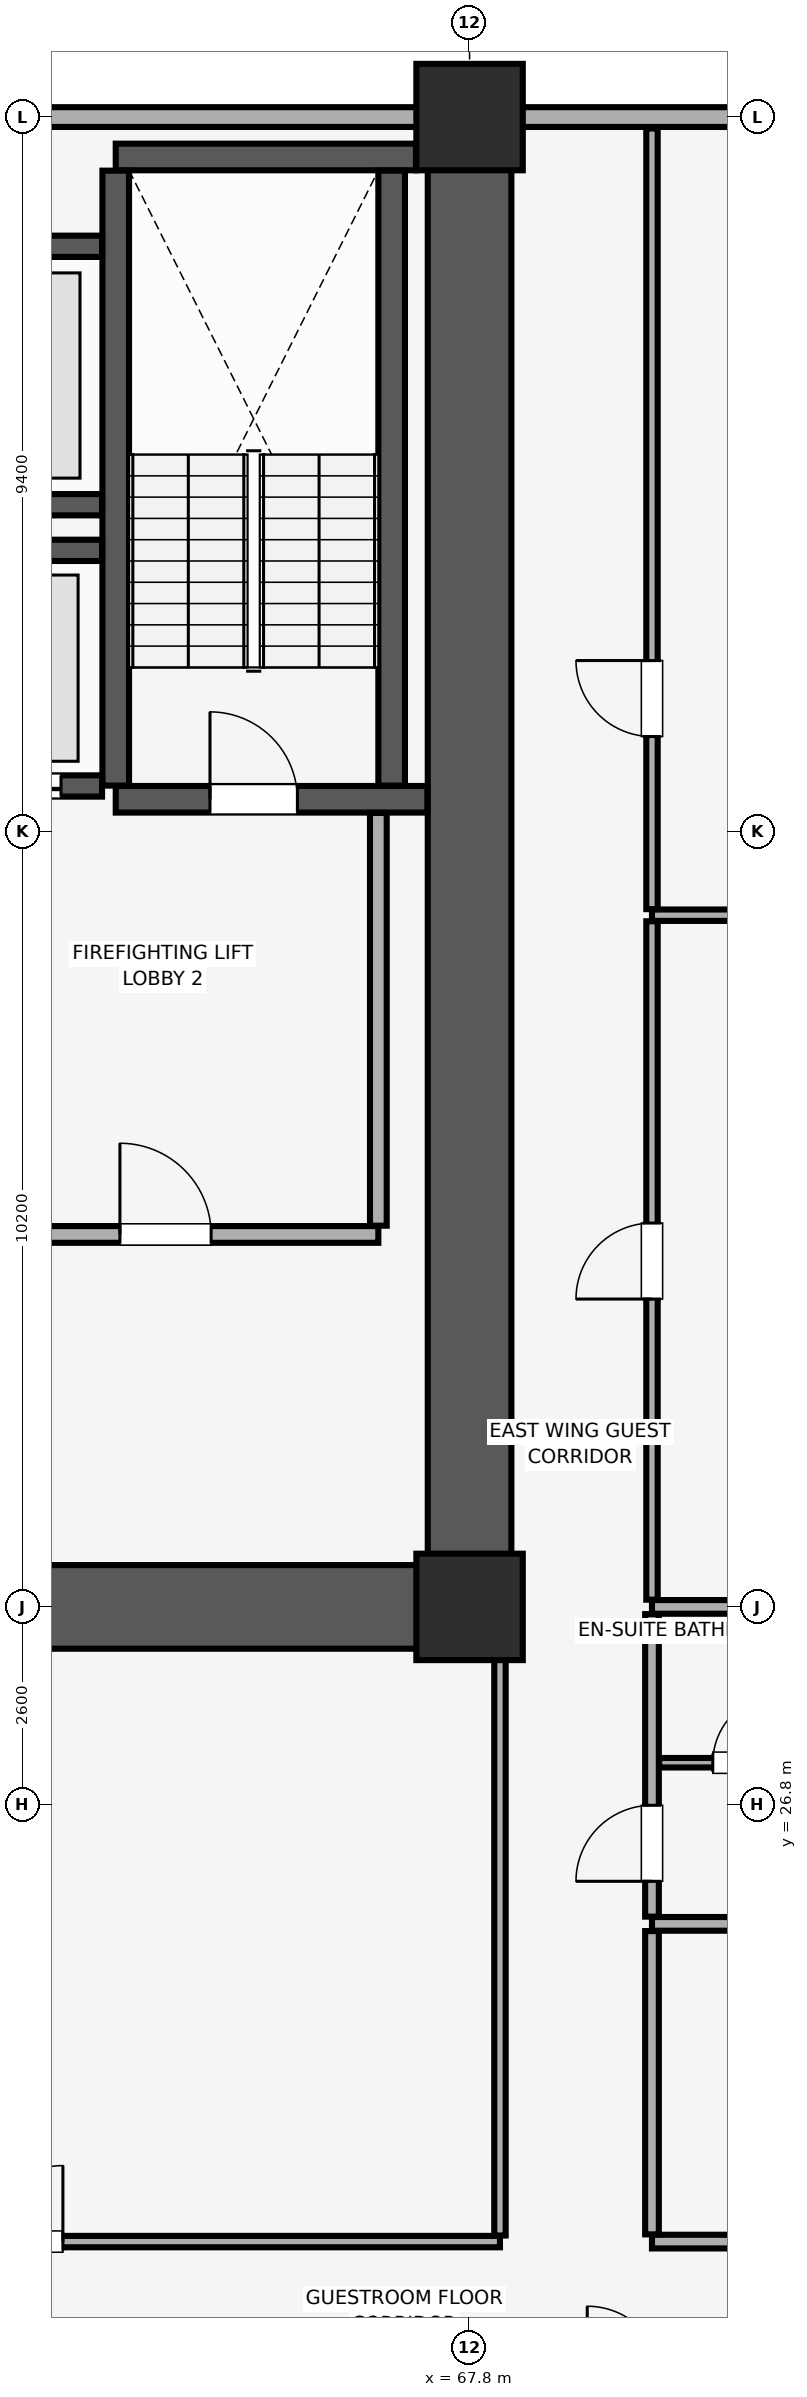
"""IFC4 building model, lengths in metres.
Left out: names, types, materials, properties, quantities, classifications, styles, units other than length and angle.
Written with IfcOpenShell. Run it as: python <this file> out.ifc"""

import sys

from ifc_helpers import new_model, si_unit, direction, frame, frame_2d, origin, origin_2d, place, context, subcontext, project, spatial, rectangle, extrude, element, fill, save


model = new_model("IFC4")
c1 = context("Model", 3, precision=1e-05, world=origin(), true_north=direction((0.0, 1.0)))
c2 = subcontext(c1, "Body", "Model", "MODEL_VIEW")
j1 = project(units=[si_unit("LENGTHUNIT", "METRE"), si_unit("PLANEANGLEUNIT", "RADIAN")], contexts=[c1])
p1 = place(None, origin())
s1 = spatial("IfcSite", under=j1, at=p1, CompositionType="ELEMENT")
p2 = place(p1, origin())
s2 = spatial("IfcBuilding", under=s1, at=p2, CompositionType="ELEMENT")
p3 = place(p2, frame((0.0, 0.0, 72.65)))
s3 = spatial("IfcBuildingStorey", under=s2, at=p3, CompositionType="ELEMENT", Elevation=72.65)
for number, where, z_axis, x_axis in (
    (1, (67.8, 29.4, 0.0), (0.0, 0.0, 1.0), (1.0, 0.0, 0.0)),
    (2, (67.8, 49.0, 0.0), (0.0, 0.0, 1.0), (1.0, 0.0, 0.0)),
):
    element("IfcColumn", number, at=place(p3, frame(where, z_axis=z_axis, x_axis=x_axis)), inside=s3, PredefinedType="COLUMN", context=c2, shape_type="SweptSolid", body=[
        extrude(rectangle(XDim=1.4, YDim=1.4, at=origin_2d()), origin(), (0.0, 0.0, 1.0), 3.51),
    ])
p4 = place(p3, frame((79.8, 49.0, 0.0), z_axis=(0.0, 0.0, 1.0), x_axis=(-1.0, 0.0, 0.0)))
e3 = element("IfcWall", 3, at=p4, inside=s3, PredefinedType="SOLIDWALL", context=c2, shape_type="SweptSolid", body=[
    extrude(rectangle(XDim=75.6, YDim=0.26, at=frame_2d((37.8, 0.0))), origin(), (0.0, 0.0, 1.0), 2.56),
])
p5 = place(p4, frame((72.565, 0.0, 0.85)))
e4 = element("IfcOpeningElement", 4, at=p5, cuts=e3, PredefinedType="OPENING", context=c2, shape_type="SweptSolid", body=[
    extrude(rectangle(XDim=1.5, YDim=1.4, at=frame_2d((0.75, 0.7))), frame((0.0, 0.14, 0.0), z_axis=(0.0, -1.0, 0.0), x_axis=(1.0, 0.0, 0.0)), (0.0, 0.0, 1.0), 0.28),
])
p6 = place(p4, frame((67.45, 0.0, 0.85)))
e5 = element("IfcOpeningElement", 5, at=p6, cuts=e3, PredefinedType="OPENING", context=c2, shape_type="SweptSolid", body=[
    extrude(rectangle(XDim=1.5, YDim=1.4, at=frame_2d((0.75, 0.7))), frame((0.0, 0.14, 0.0), z_axis=(0.0, -1.0, 0.0), x_axis=(1.0, 0.0, 0.0)), (0.0, 0.0, 1.0), 0.28),
])
p7 = place(p4, frame((6.65, 0.0, 0.85)))
e6 = element("IfcOpeningElement", 6, at=p7, cuts=e3, PredefinedType="OPENING", context=c2, shape_type="SweptSolid", body=[
    extrude(rectangle(XDim=1.5, YDim=1.4, at=frame_2d((0.75, 0.7))), frame((0.0, 0.14, 0.0), z_axis=(0.0, -1.0, 0.0), x_axis=(1.0, 0.0, 0.0)), (0.0, 0.0, 1.0), 0.28),
])
p8 = place(p4, frame((1.535, 0.0, 0.85)))
e7 = element("IfcOpeningElement", 7, at=p8, cuts=e3, PredefinedType="OPENING", context=c2, shape_type="SweptSolid", body=[
    extrude(rectangle(XDim=1.5, YDim=1.4, at=frame_2d((0.75, 0.7))), frame((0.0, 0.14, 0.0), z_axis=(0.0, -1.0, 0.0), x_axis=(1.0, 0.0, 0.0)), (0.0, 0.0, 1.0), 0.28),
])
p9 = place(p4, frame((51.365, 0.0, 0.9)))
e8 = element("IfcOpeningElement", 8, at=p9, cuts=e3, PredefinedType="OPENING", context=c2, shape_type="SweptSolid", body=[
    extrude(rectangle(XDim=1.5, YDim=1.4, at=frame_2d((0.75, 0.7))), frame((0.0, 0.14, 0.0), z_axis=(0.0, -1.0, 0.0), x_axis=(1.0, 0.0, 0.0)), (0.0, 0.0, 1.0), 0.28),
])
p10 = place(p4, frame((44.55, 0.0, 0.9)))
e9 = element("IfcOpeningElement", 9, at=p10, cuts=e3, PredefinedType="OPENING", context=c2, shape_type="SweptSolid", body=[
    extrude(rectangle(XDim=1.5, YDim=1.4, at=frame_2d((0.75, 0.7))), frame((0.0, 0.14, 0.0), z_axis=(0.0, -1.0, 0.0), x_axis=(1.0, 0.0, 0.0)), (0.0, 0.0, 1.0), 0.28),
])
p11 = place(p4, frame((28.1, 0.0, 0.9)))
e10 = element("IfcOpeningElement", 10, at=p11, cuts=e3, PredefinedType="OPENING", context=c2, shape_type="SweptSolid", body=[
    extrude(rectangle(XDim=1.5, YDim=1.4, at=frame_2d((0.75, 0.7))), frame((0.0, 0.14, 0.0), z_axis=(0.0, -1.0, 0.0), x_axis=(1.0, 0.0, 0.0)), (0.0, 0.0, 1.0), 0.28),
])
p12 = place(p4, frame((23.485, 0.0, 0.9)))
e11 = element("IfcOpeningElement", 11, at=p12, cuts=e3, PredefinedType="OPENING", context=c2, shape_type="SweptSolid", body=[
    extrude(rectangle(XDim=1.5, YDim=1.4, at=frame_2d((0.75, 0.7))), frame((0.0, 0.14, 0.0), z_axis=(0.0, -1.0, 0.0), x_axis=(1.0, 0.0, 0.0)), (0.0, 0.0, 1.0), 0.28),
])
p13 = place(p3, frame((67.8, 29.4, 0.0), z_axis=(0.0, 0.0, 1.0), x_axis=(0.0, 1.0, 0.0)))
e12 = element("IfcWall", 12, at=p13, inside=s3, PredefinedType="SHEAR", context=c2, shape_type="SweptSolid", body=[
    extrude(rectangle(XDim=19.2, YDim=1.1, at=frame_2d((9.6, 0.0))), origin(), (0.0, 0.0, 1.0), 3.51),
])
p14 = place(p3, frame((60.4, 29.4, 0.0), z_axis=(0.0, 0.0, 1.0), x_axis=(1.0, 0.0, 0.0)))
e13 = element("IfcWall", 13, at=p14, inside=s3, PredefinedType="SHEAR", context=c2, shape_type="SweptSolid", body=[
    extrude(rectangle(XDim=6.845, YDim=1.1, at=frame_2d((3.423, 0.0))), origin(), (0.0, 0.0, 1.0), 3.51),
])
p15 = place(p3, frame((63.145, 40.025, 0.0), z_axis=(0.0, 0.0, 1.0), x_axis=(1.0, 0.0, 0.0)))
e14 = element("IfcWall", 14, at=p15, inside=s3, PredefinedType="SHEAR", context=c2, shape_type="SweptSolid", body=[
    extrude(rectangle(XDim=4.1, YDim=0.35, at=frame_2d((2.05, 0.0))), origin(), (0.0, 0.0, 1.0), 3.51),
])
p16 = place(p15, frame((1.24, 0.0, 0.0)))
e15 = element("IfcOpeningElement", 15, at=p16, cuts=e14, PredefinedType="OPENING", context=c2, shape_type="SweptSolid", body=[
    extrude(rectangle(XDim=1.15, YDim=2.15, at=frame_2d((0.575, 1.075))), frame((0.0, 0.185, 0.0), z_axis=(0.0, -1.0, 0.0), x_axis=(1.0, 0.0, 0.0)), (0.0, 0.0, 1.0), 0.37),
])
p17 = place(p3, frame((63.145, 48.475, 0.0), z_axis=(0.0, 0.0, 1.0), x_axis=(1.0, 0.0, 0.0)))
e16 = element("IfcWall", 16, at=p17, inside=s3, PredefinedType="SHEAR", context=c2, shape_type="SweptSolid", body=[
    extrude(rectangle(XDim=3.95, YDim=0.35, at=frame_2d((1.975, 0.0))), origin(), (0.0, 0.0, 1.0), 3.51),
])
for number, where, z_axis, x_axis in (
    (17, (63.145, 40.205, 0.0), (0.0, 0.0, 1.0), (0.0, 1.0, 0.0)),
    (18, (66.775, 40.205, 0.0), (0.0, 0.0, 1.0), (0.0, 1.0, 0.0)),
):
    element("IfcWall", number, at=place(p3, frame(where, z_axis=z_axis, x_axis=x_axis)), inside=s3, PredefinedType="SHEAR", context=c2, shape_type="SweptSolid", body=[
        extrude(rectangle(XDim=8.09, YDim=0.35, at=frame_2d((4.045, 0.0))), origin(), (0.0, 0.0, 1.0), 3.51),
    ])
p18 = place(p3, frame((60.55, 40.2, 0.0), z_axis=(0.0, 0.0, 1.0), x_axis=(1.0, 0.0, 0.0)))
e19 = element("IfcWall", 19, at=p18, inside=s3, PredefinedType="SHEAR", context=c2, shape_type="SweptSolid", body=[
    extrude(rectangle(XDim=2.415, YDim=0.28, at=frame_2d((1.208, 0.0))), origin(), (0.0, 0.0, 1.0), 3.51),
])
p19 = place(p18, frame((0.575, 0.0, 0.0)))
e20 = element("IfcOpeningElement", 20, at=p19, cuts=e19, PredefinedType="OPENING", context=c2, shape_type="SweptSolid", body=[
    extrude(rectangle(XDim=1.3, YDim=2.3, at=frame_2d((0.65, 1.15))), frame((0.0, 0.15, 0.0), z_axis=(0.0, -1.0, 0.0), x_axis=(1.0, 0.0, 0.0)), (0.0, 0.0, 1.0), 0.3),
])
for number, where, z_axis, x_axis in (
    (21, (60.55, 43.3, 0.0), (0.0, 0.0, 1.0), (1.0, 0.0, 0.0)),
    (22, (60.55, 43.9, 0.0), (0.0, 0.0, 1.0), (1.0, 0.0, 0.0)),
    (23, (60.55, 47.3, 0.0), (0.0, 0.0, 1.0), (1.0, 0.0, 0.0)),
):
    element("IfcWall", number, at=place(p3, frame(where, z_axis=z_axis, x_axis=x_axis)), inside=s3, PredefinedType="SHEAR", context=c2, shape_type="SweptSolid", body=[
        extrude(rectangle(XDim=2.415, YDim=0.28, at=frame_2d((1.208, 0.0))), origin(), (0.0, 0.0, 1.0), 3.51),
    ])
p20 = place(p3, frame((60.55, 34.3, 0.0), z_axis=(0.0, 0.0, 1.0), x_axis=(1.0, 0.0, 0.0)))
e24 = element("IfcWall", 24, at=p20, inside=s3, PredefinedType="PARTITIONING", context=c2, shape_type="SweptSolid", body=[
    extrude(rectangle(XDim=6.05, YDim=0.22, at=frame_2d((3.025, 0.0))), origin(), (0.0, 0.0, 1.0), 3.51),
])
p21 = place(p20, frame((2.65, 0.0, 0.0)))
e25 = element("IfcOpeningElement", 25, at=p21, cuts=e24, PredefinedType="OPENING", context=c2, shape_type="SweptSolid", body=[
    extrude(rectangle(XDim=1.2, YDim=2.15, at=frame_2d((0.6, 1.075))), frame((0.0, 0.12, 0.0), z_axis=(0.0, -1.0, 0.0), x_axis=(1.0, 0.0, 0.0)), (0.0, 0.0, 1.0), 0.24),
])
p22 = place(p3, frame((66.6, 34.415, 0.0), z_axis=(0.0, 0.0, 1.0), x_axis=(0.0, 1.0, 0.0)))
e26 = element("IfcWall", 26, at=p22, inside=s3, PredefinedType="PARTITIONING", context=c2, shape_type="SweptSolid", body=[
    extrude(rectangle(XDim=5.43, YDim=0.22, at=frame_2d((2.715, 0.0))), origin(), (0.0, 0.0, 1.0), 3.51),
])
p23 = place(p3, frame((54.28, 21.05, 0.0), z_axis=(0.0, 0.0, 1.0), x_axis=(1.0, 0.0, 0.0)))
e27 = element("IfcWall", 27, at=p23, inside=s3, PredefinedType="PARTITIONING", context=c2, shape_type="SweptSolid", body=[
    extrude(rectangle(XDim=13.92, YDim=0.15, at=frame_2d((6.96, 0.0))), origin(), (0.0, 0.0, 1.0), 3.51),
])
p24 = place(p23, frame((7.17, 0.0, 0.0)))
e28 = element("IfcOpeningElement", 28, at=p24, cuts=e27, PredefinedType="OPENING", context=c2, shape_type="SweptSolid", body=[
    extrude(rectangle(XDim=1.0, YDim=2.15, at=frame_2d((0.5, 1.075))), frame((0.0, 0.085, 0.0), z_axis=(0.0, -1.0, 0.0), x_axis=(1.0, 0.0, 0.0)), (0.0, 0.0, 1.0), 0.17),
])
p25 = place(p3, frame((68.2, 21.13, 0.0), z_axis=(0.0, 0.0, 1.0), x_axis=(0.0, 1.0, 0.0)))
e29 = element("IfcWall", 29, at=p25, inside=s3, PredefinedType="PARTITIONING", context=c2, shape_type="SweptSolid", body=[
    extrude(rectangle(XDim=8.26, YDim=0.15, at=frame_2d((4.13, 0.0))), origin(), (0.0, 0.0, 1.0), 3.51),
])
p26 = place(p3, frame((70.2, 21.05, 0.0), z_axis=(0.0, 0.0, 1.0), x_axis=(1.0, 0.0, 0.0)))
e30 = element("IfcWall", 30, at=p26, inside=s3, PredefinedType="PARTITIONING", context=c2, shape_type="SweptSolid", body=[
    extrude(rectangle(XDim=13.65, YDim=0.18, at=frame_2d((6.825, 0.0))), origin(), (0.0, 0.0, 1.0), 3.51),
])
p27 = place(p26, frame((1.51, 0.0, 0.0)))
e31 = element("IfcOpeningElement", 31, at=p27, cuts=e30, PredefinedType="OPENING", context=c2, shape_type="SweptSolid", body=[
    extrude(rectangle(XDim=1.0, YDim=2.15, at=frame_2d((0.5, 1.075))), frame((0.0, 0.1, 0.0), z_axis=(0.0, -1.0, 0.0), x_axis=(1.0, 0.0, 0.0)), (0.0, 0.0, 1.0), 0.2),
])
p28 = place(p3, frame((70.2, 25.23, 0.0), z_axis=(0.0, 0.0, 1.0), x_axis=(1.0, 0.0, 0.0)))
e32 = element("IfcWall", 32, at=p28, inside=s3, PredefinedType="PARTITIONING", context=c2, shape_type="SweptSolid", body=[
    extrude(rectangle(XDim=13.65, YDim=0.18, at=frame_2d((6.825, 0.0))), origin(), (0.0, 0.0, 1.0), 3.51),
])
p29 = place(p3, frame((70.2, 21.145, 0.0), z_axis=(0.0, 0.0, 1.0), x_axis=(0.0, 1.0, 0.0)))
e33 = element("IfcWall", 33, at=p29, inside=s3, PredefinedType="PARTITIONING", context=c2, shape_type="SweptSolid", body=[
    extrude(rectangle(XDim=3.99, YDim=0.18, at=frame_2d((1.995, 0.0))), origin(), (0.0, 0.0, 1.0), 3.51),
])
p30 = place(p3, frame((70.2, 29.4, 0.0), z_axis=(0.0, 0.0, 1.0), x_axis=(1.0, 0.0, 0.0)))
e34 = element("IfcWall", 34, at=p30, inside=s3, PredefinedType="PARTITIONING", context=c2, shape_type="SweptSolid", body=[
    extrude(rectangle(XDim=13.65, YDim=0.18, at=frame_2d((6.825, 0.0))), origin(), (0.0, 0.0, 1.0), 2.86),
])
p31 = place(p3, frame((70.2, 25.325, 0.0), z_axis=(0.0, 0.0, 1.0), x_axis=(0.0, 1.0, 0.0)))
e35 = element("IfcWall", 35, at=p31, inside=s3, PredefinedType="PARTITIONING", context=c2, shape_type="SweptSolid", body=[
    extrude(rectangle(XDim=3.98, YDim=0.18, at=frame_2d((1.99, 0.0))), origin(), (0.0, 0.0, 1.0), 3.51),
])
p32 = place(p31, frame((0.465, 0.0, 0.0)))
e36 = element("IfcOpeningElement", 36, at=p32, cuts=e35, PredefinedType="OPENING", context=c2, shape_type="SweptSolid", body=[
    extrude(rectangle(XDim=1.0, YDim=2.15, at=frame_2d((0.5, 1.075))), frame((0.0, 0.1, 0.0), z_axis=(0.0, -1.0, 0.0), x_axis=(1.0, 0.0, 0.0)), (0.0, 0.0, 1.0), 0.2),
])
p33 = place(p3, frame((70.295, 27.35, 0.0), z_axis=(0.0, 0.0, 1.0), x_axis=(1.0, 0.0, 0.0)))
e37 = element("IfcWall", 37, at=p33, inside=s3, PredefinedType="PARTITIONING", context=c2, shape_type="SweptSolid", body=[
    extrude(rectangle(XDim=2.405, YDim=0.125, at=frame_2d((1.203, 0.0))), origin(), (0.0, 0.0, 1.0), 3.51),
])
p34 = place(p33, frame((0.705, 0.0, 0.0)))
e38 = element("IfcOpeningElement", 38, at=p34, cuts=e37, PredefinedType="OPENING", context=c2, shape_type="SweptSolid", body=[
    extrude(rectangle(XDim=0.9, YDim=2.1, at=frame_2d((0.45, 1.05))), frame((0.0, 0.073, 0.0), z_axis=(0.0, -1.0, 0.0), x_axis=(1.0, 0.0, 0.0)), (0.0, 0.0, 1.0), 0.145),
])
p35 = place(p3, frame((70.2, 38.5, 0.0), z_axis=(0.0, 0.0, 1.0), x_axis=(1.0, 0.0, 0.0)))
e39 = element("IfcWall", 39, at=p35, inside=s3, PredefinedType="PARTITIONING", context=c2, shape_type="SweptSolid", body=[
    extrude(rectangle(XDim=13.65, YDim=0.15, at=frame_2d((6.825, 0.0))), origin(), (0.0, 0.0, 1.0), 3.51),
])
p36 = place(p3, frame((70.2, 29.495, 0.0), z_axis=(0.0, 0.0, 1.0), x_axis=(0.0, 1.0, 0.0)))
e40 = element("IfcWall", 40, at=p36, inside=s3, PredefinedType="PARTITIONING", context=c2, shape_type="SweptSolid", body=[
    extrude(rectangle(XDim=8.925, YDim=0.15, at=frame_2d((4.462, 0.0))), origin(), (0.0, 0.0, 1.0), 3.51),
])
p37 = place(p36, frame((3.955, 0.0, 0.0)))
e41 = element("IfcOpeningElement", 41, at=p37, cuts=e40, PredefinedType="OPENING", context=c2, shape_type="SweptSolid", body=[
    extrude(rectangle(XDim=1.0, YDim=2.15, at=frame_2d((0.5, 1.075))), frame((0.0, 0.085, 0.0), z_axis=(0.0, -1.0, 0.0), x_axis=(1.0, 0.0, 0.0)), (0.0, 0.0, 1.0), 0.17),
])
p38 = place(p3, frame((70.2, 38.58, 0.0), z_axis=(0.0, 0.0, 1.0), x_axis=(0.0, 1.0, 0.0)))
e42 = element("IfcWall", 42, at=p38, inside=s3, PredefinedType="PARTITIONING", context=c2, shape_type="SweptSolid", body=[
    extrude(rectangle(XDim=10.27, YDim=0.15, at=frame_2d((5.135, 0.0))), origin(), (0.0, 0.0, 1.0), 3.51),
])
p39 = place(p38, frame((2.27, 0.0, 0.0)))
e43 = element("IfcOpeningElement", 43, at=p39, cuts=e42, PredefinedType="OPENING", context=c2, shape_type="SweptSolid", body=[
    extrude(rectangle(XDim=1.0, YDim=2.15, at=frame_2d((0.5, 1.075))), frame((0.0, 0.085, 0.0), z_axis=(0.0, -1.0, 0.0), x_axis=(1.0, 0.0, 0.0)), (0.0, 0.0, 1.0), 0.17),
])
p40 = place(p16, origin())
e44 = element("IfcDoor", 44, at=p40, inside=s3, OperationType="SINGLE_SWING_LEFT", PredefinedType="DOOR", context=c2, shape_type="SweptSolid", body=[
    extrude(rectangle(XDim=1.15, YDim=2.15, at=frame_2d((0.575, 1.075))), frame((0.0, 0.025, 0.0), z_axis=(0.0, -1.0, 0.0), x_axis=(1.0, 0.0, 0.0)), (0.0, 0.0, 1.0), 0.05),
])
fill(e15, e44)
p41 = place(p19, origin())
e45 = element("IfcDoor", 45, at=p41, inside=s3, OperationType="DOUBLE_DOOR_SLIDING", PredefinedType="DOOR", context=c2, shape_type="SweptSolid", body=[
    extrude(rectangle(XDim=1.3, YDim=2.3, at=frame_2d((0.65, 1.15))), frame((0.0, 0.025, 0.0), z_axis=(0.0, -1.0, 0.0), x_axis=(1.0, 0.0, 0.0)), (0.0, 0.0, 1.0), 0.05),
])
fill(e20, e45)
p42 = place(p21, origin())
e46 = element("IfcDoor", 46, at=p42, inside=s3, OperationType="SINGLE_SWING_LEFT", PredefinedType="DOOR", context=c2, shape_type="SweptSolid", body=[
    extrude(rectangle(XDim=1.2, YDim=2.15, at=frame_2d((0.6, 1.075))), frame((0.0, 0.025, 0.0), z_axis=(0.0, -1.0, 0.0), x_axis=(1.0, 0.0, 0.0)), (0.0, 0.0, 1.0), 0.05),
])
fill(e25, e46)
p43 = place(p24, origin())
e47 = element("IfcDoor", 47, at=p43, inside=s3, OperationType="SINGLE_SWING_RIGHT", PredefinedType="DOOR", context=c2, shape_type="SweptSolid", body=[
    extrude(rectangle(XDim=1.0, YDim=2.15, at=frame_2d((0.5, 1.075))), frame((0.0, 0.025, 0.0), z_axis=(0.0, -1.0, 0.0), x_axis=(1.0, 0.0, 0.0)), (0.0, 0.0, 1.0), 0.05),
])
fill(e28, e47)
p44 = place(p32, origin())
e48 = element("IfcDoor", 48, at=p44, inside=s3, OperationType="SINGLE_SWING_LEFT", PredefinedType="DOOR", context=c2, shape_type="SweptSolid", body=[
    extrude(rectangle(XDim=1.0, YDim=2.15, at=frame_2d((0.5, 1.075))), frame((0.0, 0.025, 0.0), z_axis=(0.0, -1.0, 0.0), x_axis=(1.0, 0.0, 0.0)), (0.0, 0.0, 1.0), 0.05),
])
fill(e36, e48)
p45 = place(p34, origin())
e49 = element("IfcDoor", 49, at=p45, inside=s3, OperationType="SINGLE_SWING_RIGHT", PredefinedType="DOOR", context=c2, shape_type="SweptSolid", body=[
    extrude(rectangle(XDim=0.9, YDim=2.1, at=frame_2d((0.45, 1.05))), frame((0.0, 0.025, 0.0), z_axis=(0.0, -1.0, 0.0), x_axis=(1.0, 0.0, 0.0)), (0.0, 0.0, 1.0), 0.05),
])
fill(e38, e49)
p46 = place(p37, origin())
e50 = element("IfcDoor", 50, at=p46, inside=s3, OperationType="SINGLE_SWING_LEFT", PredefinedType="DOOR", context=c2, shape_type="SweptSolid", body=[
    extrude(rectangle(XDim=1.0, YDim=2.15, at=frame_2d((0.5, 1.075))), frame((0.0, 0.025, 0.0), z_axis=(0.0, -1.0, 0.0), x_axis=(1.0, 0.0, 0.0)), (0.0, 0.0, 1.0), 0.05),
])
fill(e41, e50)
p47 = place(p39, origin())
e51 = element("IfcDoor", 51, at=p47, inside=s3, OperationType="SINGLE_SWING_RIGHT", PredefinedType="DOOR", context=c2, shape_type="SweptSolid", body=[
    extrude(rectangle(XDim=1.0, YDim=2.15, at=frame_2d((0.5, 1.075))), frame((0.0, 0.025, 0.0), z_axis=(0.0, -1.0, 0.0), x_axis=(1.0, 0.0, 0.0)), (0.0, 0.0, 1.0), 0.05),
])
fill(e43, e51)
save(model, sys.argv[1])
